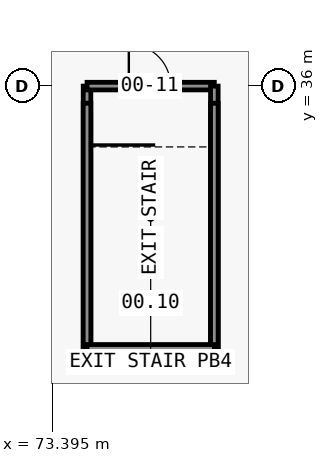
"""IFC4 building model, lengths in metres.
Left out: names, types, materials, properties, quantities, classifications, styles, units other than length and angle.
Written with IfcOpenShell. Run it as: python <this file> out.ifc"""

import sys

from ifc_helpers import new_model, si_unit, direction, frame, frame_2d, origin, place, context, subcontext, project, spatial, rectangle, extrude, element, fill, save


model = new_model("IFC4")
c1 = context("Model", 3, precision=1e-05, world=origin(), true_north=direction((0.0, 1.0)))
c2 = subcontext(c1, "Body", "Model", "MODEL_VIEW")
j1 = project(units=[si_unit("LENGTHUNIT", "METRE"), si_unit("PLANEANGLEUNIT", "RADIAN")], contexts=[c1])
p1 = place(None, origin())
s1 = spatial("IfcSite", under=j1, at=p1, CompositionType="ELEMENT")
p2 = place(p1, origin())
s2 = spatial("IfcBuilding", under=s1, at=p2, CompositionType="ELEMENT")
p3 = place(p2, origin())
s3 = spatial("IfcBuildingStorey", under=s2, at=p3, CompositionType="ELEMENT", Elevation=0.0)
p4 = place(p3, frame((74.3, 29.1, 0.0), z_axis=(0.0, 0.0, 1.0), x_axis=(0.0, 1.0, 0.0)))
e1 = element("IfcWall", 1, at=p4, inside=s3, PredefinedType="PARTITIONING", context=c2, shape_type="SweptSolid", body=[
    extrude(rectangle(XDim=6.9, YDim=0.2, at=frame_2d((3.45, 0.0))), origin(), (0.0, 0.0, 1.0), 6.95),
])
p5 = place(p3, frame((74.3, 36.0, 0.0), z_axis=(0.0, 0.0, 1.0), x_axis=(1.0, 0.0, 0.0)))
e2 = element("IfcWall", 2, at=p5, inside=s3, PredefinedType="PARTITIONING", context=c2, shape_type="SweptSolid", body=[
    extrude(rectangle(XDim=3.35, YDim=0.2, at=frame_2d((1.675, 0.0))), origin(), (0.0, 0.0, 1.0), 6.95),
])
p6 = place(p5, frame((1.1, 0.0, 0.0)))
e3 = element("IfcOpeningElement", 3, at=p6, cuts=e2, PredefinedType="OPENING", context=c2, shape_type="SweptSolid", body=[
    extrude(rectangle(XDim=1.1, YDim=2.1, at=frame_2d((0.55, 1.05))), frame((0.0, 0.11, 0.0), z_axis=(0.0, -1.0, 0.0), x_axis=(1.0, 0.0, 0.0)), (0.0, 0.0, 1.0), 0.22),
])
p7 = place(p3, frame((77.65, 36.0, 0.0), z_axis=(0.0, 0.0, 1.0), x_axis=(0.0, -1.0, 0.0)))
e4 = element("IfcWall", 4, at=p7, inside=s3, PredefinedType="PARTITIONING", context=c2, shape_type="SweptSolid", body=[
    extrude(rectangle(XDim=6.9, YDim=0.2, at=frame_2d((3.45, 0.0))), origin(), (0.0, 0.0, 1.0), 6.95),
])
p8 = place(p3, frame((77.65, 29.1, 0.0), z_axis=(0.0, 0.0, 1.0), x_axis=(-1.0, 0.0, 0.0)))
e5 = element("IfcWall", 5, at=p8, inside=s3, PredefinedType="PARTITIONING", context=c2, shape_type="SweptSolid", body=[
    extrude(rectangle(XDim=3.35, YDim=0.2, at=frame_2d((1.675, 0.0))), origin(), (0.0, 0.0, 1.0), 7.65),
])
for number, where, z_axis, x_axis in (
    (6, (74.3, 29.1, 6.95), (0.0, 0.0, 1.0), (0.0, 1.0, 0.0)),
    (7, (77.65, 35.55, 6.95), (0.0, 0.0, 1.0), (0.0, -1.0, 0.0)),
):
    element("IfcWall", number, at=place(p3, frame(where, z_axis=z_axis, x_axis=x_axis)), inside=s3, PredefinedType="PARTITIONING", context=c2, shape_type="SweptSolid", body=[
        extrude(rectangle(XDim=6.45, YDim=0.2, at=frame_2d((3.225, 0.0))), origin(), (0.0, 0.0, 1.0), 0.7),
    ])
p9 = place(p6, origin())
e8 = element("IfcDoor", 8, at=p9, inside=s3, OperationType="SINGLE_SWING_LEFT", PredefinedType="DOOR", context=c2, shape_type="SweptSolid", body=[
    extrude(rectangle(XDim=1.1, YDim=2.1, at=frame_2d((0.55, 1.05))), frame((0.0, 0.025, 0.0), z_axis=(0.0, -1.0, 0.0), x_axis=(1.0, 0.0, 0.0)), (0.0, 0.0, 1.0), 0.05),
])
fill(e3, e8)
save(model, sys.argv[1])
